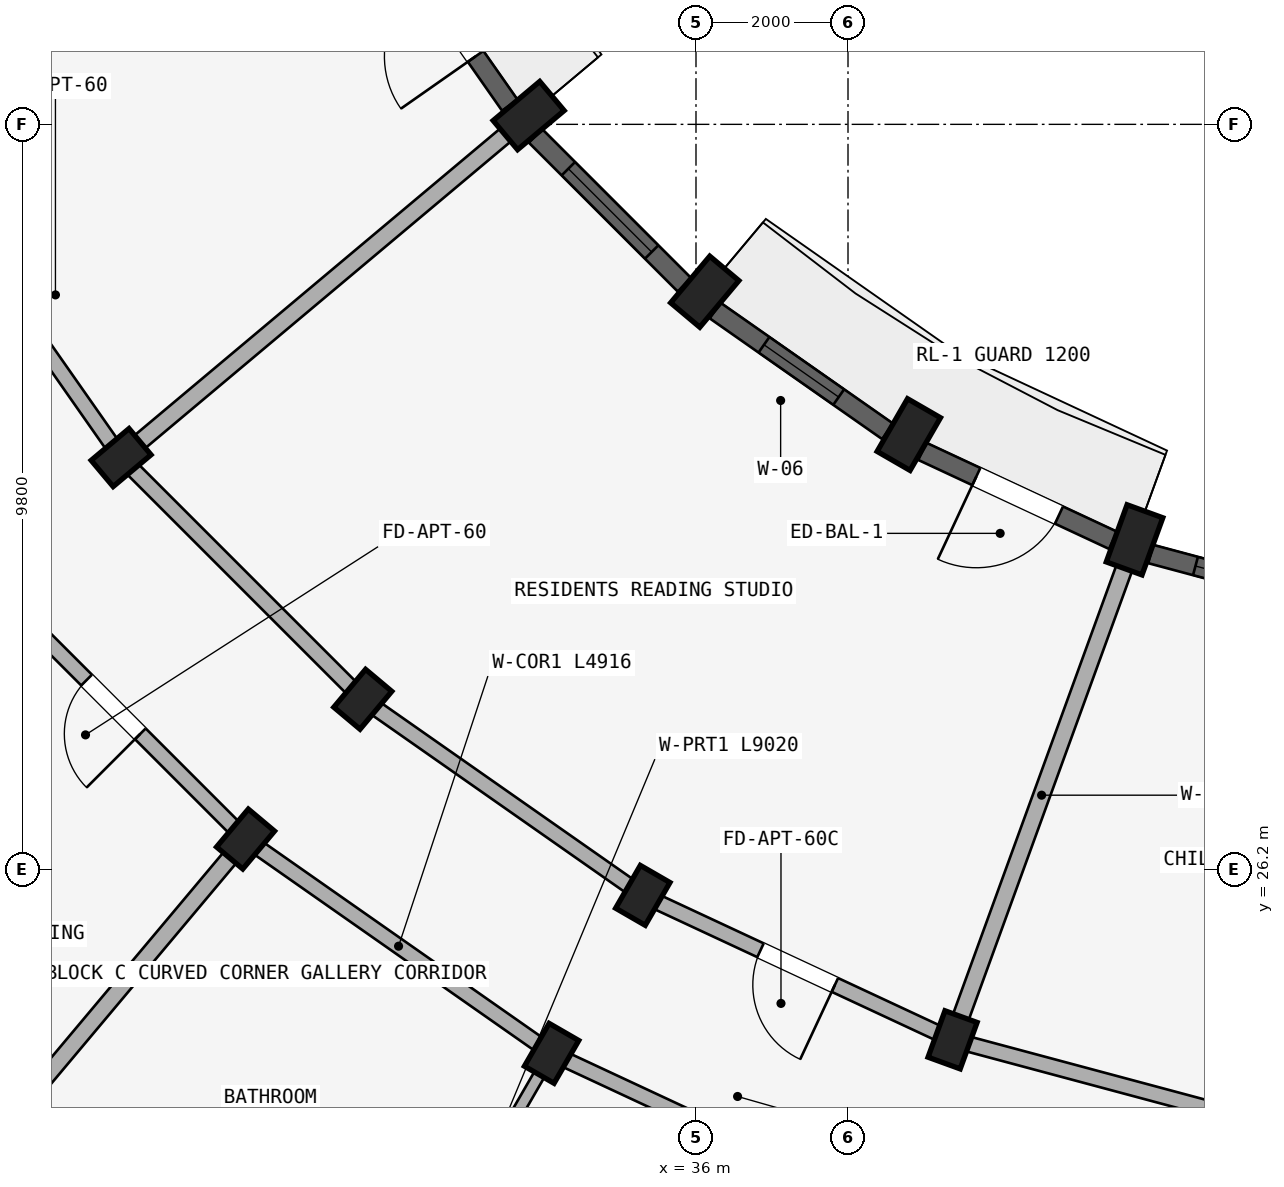
"""IFC4 building model, lengths in metres.
Left out: names, types, materials, properties, quantities, classifications, styles, units other than length and angle.
Written with IfcOpenShell. Run it as: python <this file> out.ifc"""

import sys

from ifc_helpers import new_model, si_unit, direction, frame, frame_2d, origin, origin_2d, place, context, subcontext, project, spatial, rectangle, extrude, element, fill, save


model = new_model("IFC4")
c1 = context("Model", 3, precision=1e-05, world=origin(), true_north=direction((0.0, 1.0)))
c2 = subcontext(c1, "Body", "Model", "MODEL_VIEW")
j1 = project(units=[si_unit("LENGTHUNIT", "METRE"), si_unit("PLANEANGLEUNIT", "RADIAN")], contexts=[c1])
p1 = place(None, origin())
s1 = spatial("IfcSite", under=j1, at=p1, CompositionType="ELEMENT")
p2 = place(p1, origin())
s2 = spatial("IfcBuilding", under=s1, at=p2, CompositionType="ELEMENT")
p3 = place(p2, frame((0.0, 0.0, 27.6)))
s3 = spatial("IfcBuildingStorey", under=s2, at=p3, CompositionType="ELEMENT", Elevation=27.6)
p4 = place(p3, frame((41.77, 30.534, 0.0), z_axis=(0.0, 0.0, 1.0), x_axis=(-0.939692620786, 0.342020143326, 0.0)))
e1 = element("IfcColumn", 1, at=p4, inside=s3, PredefinedType="COLUMN", context=c2, shape_type="SweptSolid", body=[
    extrude(rectangle(XDim=0.5, YDim=0.8, at=origin_2d()), origin(), (0.0, 0.0, 1.0), 2.93),
])
p5 = place(p3, frame((39.376, 23.956, 0.0), z_axis=(0.0, 0.0, 1.0), x_axis=(-0.939692620786, 0.342020143326, 0.0)))
e2 = element("IfcColumn", 2, at=p5, inside=s3, PredefinedType="COLUMN", context=c2, shape_type="SweptSolid", body=[
    extrude(rectangle(XDim=0.45, YDim=0.65, at=origin_2d()), origin(), (0.0, 0.0, 1.0), 2.93),
])
p6 = place(p3, frame((38.8, 31.919, 0.0), z_axis=(0.0, 0.0, 1.0), x_axis=(-0.866025403784, 0.5, 0.0)))
e3 = element("IfcColumn", 3, at=p6, inside=s3, PredefinedType="COLUMN", context=c2, shape_type="SweptSolid", body=[
    extrude(rectangle(XDim=0.5, YDim=0.8, at=origin_2d()), origin(), (0.0, 0.0, 1.0), 2.93),
])
for number, where, z_axis, x_axis in (
    (4, (35.3, 25.856, 0.0), (0.0, 0.0, 1.0), (-0.866, 0.5, 0.0)),
    (5, (34.1, 23.778, 0.0), (0.0, 0.0, 1.0), (-0.866, 0.5, 0.0)),
):
    element("IfcColumn", number, at=place(p3, frame(where, z_axis=z_axis, x_axis=x_axis)), inside=s3, PredefinedType="COLUMN", context=c2, shape_type="SweptSolid", body=[
        extrude(rectangle(XDim=0.45, YDim=0.65, at=origin_2d()), origin(), (0.0, 0.0, 1.0), 2.93),
    ])
p7 = place(p3, frame((36.115, 33.798, 0.0), z_axis=(0.0, 0.0, 1.0), x_axis=(-0.766044443119, 0.642787609687, 0.0)))
e6 = element("IfcColumn", 6, at=p7, inside=s3, PredefinedType="COLUMN", context=c2, shape_type="SweptSolid", body=[
    extrude(rectangle(XDim=0.5, YDim=0.8, at=origin_2d()), origin(), (0.0, 0.0, 1.0), 2.93),
])
for number, where, z_axis, x_axis in (
    (7, (31.616, 28.436, 0.0), (0.0, 0.0, 1.0), (-0.766, 0.643, 0.0)),
    (8, (30.073, 26.598, 0.0), (0.0, 0.0, 1.0), (-0.766, 0.643, 0.0)),
):
    element("IfcColumn", number, at=place(p3, frame(where, z_axis=z_axis, x_axis=x_axis)), inside=s3, PredefinedType="COLUMN", context=c2, shape_type="SweptSolid", body=[
        extrude(rectangle(XDim=0.45, YDim=0.65, at=origin_2d()), origin(), (0.0, 0.0, 1.0), 2.93),
    ])
p8 = place(p3, frame((33.798, 36.115, 0.0), z_axis=(0.0, 0.0, 1.0), x_axis=(-0.642787609687, 0.766044443119, 0.0)))
e9 = element("IfcColumn", 9, at=p8, inside=s3, PredefinedType="COLUMN", context=c2, shape_type="SweptSolid", body=[
    extrude(rectangle(XDim=0.5, YDim=0.8, at=origin_2d()), origin(), (0.0, 0.0, 1.0), 2.93),
])
p9 = place(p3, frame((28.436, 31.616, 0.0), z_axis=(0.0, 0.0, 1.0), x_axis=(-0.642787609687, 0.766044443119, 0.0)))
e10 = element("IfcColumn", 10, at=p9, inside=s3, PredefinedType="COLUMN", context=c2, shape_type="SweptSolid", body=[
    extrude(rectangle(XDim=0.45, YDim=0.65, at=origin_2d()), origin(), (0.0, 0.0, 1.0), 2.93),
])
p10 = place(p3, frame((43.72, 22.792, 0.0), z_axis=(0.0, 0.0, 1.0), x_axis=(-0.965934240054, 0.258787642463, 0.0)))
e11 = element("IfcWall", 11, at=p10, inside=s3, PredefinedType="STANDARD", context=c2, shape_type="SweptSolid", body=[
    extrude(rectangle(XDim=4.497, YDim=0.2, at=frame_2d((2.249, 0.0))), origin(), (0.0, 0.0, 1.0), 2.372),
])
p11 = place(p3, frame((39.376, 23.956, 0.0), z_axis=(0.0, 0.0, 1.0), x_axis=(-0.906307919131, 0.422617978463, 0.0)))
e12 = element("IfcWall", 12, at=p11, inside=s3, PredefinedType="STANDARD", context=c2, shape_type="SweptSolid", body=[
    extrude(rectangle(XDim=4.497, YDim=0.2, at=frame_2d((2.249, 0.0))), origin(), (0.0, 0.0, 1.0), 2.372),
])
p12 = place(p11, frame((1.709, 0.0, 0.0)))
e13 = element("IfcOpeningElement", 13, at=p12, cuts=e12, PredefinedType="OPENING", context=c2, shape_type="SweptSolid", body=[
    extrude(rectangle(XDim=1.08, YDim=2.15, at=frame_2d((0.54, 1.075))), frame((0.0, 0.11, 0.0), z_axis=(0.0, -1.0, 0.0), x_axis=(1.0, 0.0, 0.0)), (0.0, 0.0, 1.0), 0.22),
])
p13 = place(p3, frame((38.555, 21.701, 0.0), z_axis=(0.0, 0.0, 1.0), x_axis=(-0.906302381024, 0.422629854778, 0.0)))
e14 = element("IfcWall", 14, at=p13, inside=s3, PredefinedType="STANDARD", context=c2, shape_type="SweptSolid", body=[
    extrude(rectangle(XDim=4.915, YDim=0.2, at=frame_2d((2.458, 0.0))), origin(), (0.0, 0.0, 1.0), 2.372),
])
p14 = place(p13, frame((1.888, 0.0, 0.0)))
e15 = element("IfcOpeningElement", 15, at=p14, cuts=e14, PredefinedType="OPENING", context=c2, shape_type="SweptSolid", body=[
    extrude(rectangle(XDim=1.14, YDim=2.15, at=frame_2d((0.57, 1.075))), frame((0.0, 0.11, 0.0), z_axis=(0.0, -1.0, 0.0), x_axis=(1.0, 0.0, 0.0)), (0.0, 0.0, 1.0), 0.22),
])
p15 = place(p3, frame((35.3, 25.856, 0.0), z_axis=(0.0, 0.0, 1.0), x_axis=(-0.819155404658, 0.573571637217, 0.0)))
e16 = element("IfcWall", 16, at=p15, inside=s3, PredefinedType="STANDARD", context=c2, shape_type="SweptSolid", body=[
    extrude(rectangle(XDim=4.497, YDim=0.2, at=frame_2d((2.249, 0.0))), origin(), (0.0, 0.0, 1.0), 2.372),
])
p16 = place(p3, frame((34.1, 23.778, 0.0), z_axis=(0.0, 0.0, 1.0), x_axis=(-0.819140911474, 0.573592335331, 0.0)))
e17 = element("IfcWall", 17, at=p16, inside=s3, PredefinedType="STANDARD", context=c2, shape_type="SweptSolid", body=[
    extrude(rectangle(XDim=4.916, YDim=0.2, at=frame_2d((2.458, 0.0))), origin(), (0.0, 0.0, 1.0), 2.372),
])
p17 = place(p3, frame((31.616, 28.436, 0.0), z_axis=(0.0, 0.0, 1.0), x_axis=(-0.707106781187, 0.707106781187, 0.0)))
e18 = element("IfcWall", 18, at=p17, inside=s3, PredefinedType="STANDARD", context=c2, shape_type="SweptSolid", body=[
    extrude(rectangle(XDim=4.497, YDim=0.2, at=frame_2d((2.249, 0.0))), origin(), (0.0, 0.0, 1.0), 2.372),
])
p18 = place(p3, frame((30.073, 26.598, 0.0), z_axis=(0.0, 0.0, 1.0), x_axis=(-0.707106781187, 0.707106781187, 0.0)))
e19 = element("IfcWall", 19, at=p18, inside=s3, PredefinedType="STANDARD", context=c2, shape_type="SweptSolid", body=[
    extrude(rectangle(XDim=4.916, YDim=0.2, at=frame_2d((2.458, 0.0))), origin(), (0.0, 0.0, 1.0), 2.372),
])
p19 = place(p18, frame((1.958, 0.0, 0.0)))
e20 = element("IfcOpeningElement", 20, at=p19, cuts=e19, PredefinedType="OPENING", context=c2, shape_type="SweptSolid", body=[
    extrude(rectangle(XDim=1.0, YDim=2.15, at=frame_2d((0.5, 1.075))), frame((0.0, 0.11, 0.0), z_axis=(0.0, -1.0, 0.0), x_axis=(1.0, 0.0, 0.0)), (0.0, 0.0, 1.0), 0.22),
])
p20 = place(p3, frame((28.436, 31.616, 0.0), z_axis=(0.0, 0.0, 1.0), x_axis=(-0.573571637217, 0.819155404658, 0.0)))
e21 = element("IfcWall", 21, at=p20, inside=s3, PredefinedType="STANDARD", context=c2, shape_type="SweptSolid", body=[
    extrude(rectangle(XDim=4.497, YDim=0.2, at=frame_2d((2.249, 0.0))), origin(), (0.0, 0.0, 1.0), 2.372),
])
p21 = place(p20, frame((1.749, 0.0, 0.0)))
e22 = element("IfcOpeningElement", 22, at=p21, cuts=e21, PredefinedType="OPENING", context=c2, shape_type="SweptSolid", body=[
    extrude(rectangle(XDim=1.0, YDim=2.15, at=frame_2d((0.5, 1.075))), frame((0.0, 0.11, 0.0), z_axis=(0.0, -1.0, 0.0), x_axis=(1.0, 0.0, 0.0)), (0.0, 0.0, 1.0), 0.22),
])
p22 = place(p3, frame((41.702, 30.346, 0.0), z_axis=(0.0, 0.0, 1.0), x_axis=(-0.342010221662, -0.939696231917, 0.0)))
e23 = element("IfcWall", 23, at=p22, inside=s3, PredefinedType="STANDARD", context=c2, shape_type="SweptSolid", body=[
    extrude(rectangle(XDim=6.75, YDim=0.22, at=frame_2d((3.375, 0.0))), origin(), (0.0, 0.0, 1.0), 2.372),
])
p23 = place(p3, frame((34.05, 23.691, 0.0), z_axis=(0.0, 0.0, 1.0), x_axis=(-0.500002045973, -0.866024222538, 0.0)))
e24 = element("IfcWall", 24, at=p23, inside=s3, PredefinedType="PARTITIONING", context=c2, shape_type="SweptSolid", body=[
    extrude(rectangle(XDim=9.02, YDim=0.15, at=frame_2d((4.51, 0.0))), origin(), (0.0, 0.0, 1.0), 2.372),
])
p24 = place(p23, frame((4.45, 0.0, 0.0)))
e25 = element("IfcOpeningElement", 25, at=p24, cuts=e24, PredefinedType="OPENING", context=c2, shape_type="SweptSolid", body=[
    extrude(rectangle(XDim=0.8, YDim=2.1, at=frame_2d((0.4, 1.05))), frame((0.0, 0.085, 0.0), z_axis=(0.0, -1.0, 0.0), x_axis=(1.0, 0.0, 0.0)), (0.0, 0.0, 1.0), 0.17),
])
p25 = place(p3, frame((30.009, 26.521, 0.0), z_axis=(0.0, 0.0, 1.0), x_axis=(-0.642784468535, -0.766047078847, 0.0)))
e26 = element("IfcWall", 26, at=p25, inside=s3, PredefinedType="STANDARD", context=c2, shape_type="SweptSolid", body=[
    extrude(rectangle(XDim=9.02, YDim=0.22, at=frame_2d((4.51, 0.0))), origin(), (0.0, 0.0, 1.0), 2.372),
])
p26 = place(p3, frame((33.645, 35.987, 0.0), z_axis=(0.0, 0.0, 1.0), x_axis=(-0.766046761698, -0.642784846501, 0.0)))
e27 = element("IfcWall", 27, at=p26, inside=s3, PredefinedType="STANDARD", context=c2, shape_type="SweptSolid", body=[
    extrude(rectangle(XDim=6.75, YDim=0.22, at=frame_2d((3.375, 0.0))), origin(), (0.0, 0.0, 1.0), 2.372),
])
p27 = place(p3, frame((44.658, 29.631, 0.0), z_axis=(0.0, 0.0, 1.0), x_axis=(-0.965935855992, 0.25878161084, 0.0)))
e28 = element("IfcWall", 28, at=p27, inside=s3, PredefinedType="STANDARD", context=c2, shape_type="SweptSolid", body=[
    extrude(rectangle(XDim=2.77, YDim=0.25, at=frame_2d((1.385, 0.0))), origin(), (0.0, 0.0, 1.0), 2.472),
])
p28 = place(p27, frame((0.61, 0.0, 0.672)))
e29 = element("IfcOpeningElement", 29, at=p28, cuts=e28, PredefinedType="OPENING", context=c2, shape_type="SweptSolid", body=[
    extrude(rectangle(XDim=1.55, YDim=1.6, at=frame_2d((0.775, 0.8))), frame((0.0, 0.135, 0.0), z_axis=(0.0, -1.0, 0.0), x_axis=(1.0, 0.0, 0.0)), (0.0, 0.0, 1.0), 0.27),
])
p29 = place(p3, frame((41.487, 30.528, 0.0), z_axis=(0.0, 0.0, 1.0), x_axis=(-0.906293449611, 0.422649007088, 0.0)))
e30 = element("IfcWall", 30, at=p29, inside=s3, PredefinedType="STANDARD", context=c2, shape_type="SweptSolid", body=[
    extrude(rectangle(XDim=2.77, YDim=0.25, at=frame_2d((1.385, 0.0))), origin(), (0.0, 0.0, 1.0), 2.472),
])
p30 = place(p29, frame((0.785, 0.0, 0.0)))
e31 = element("IfcOpeningElement", 31, at=p30, cuts=e30, PredefinedType="OPENING", context=c2, shape_type="SweptSolid", body=[
    extrude(rectangle(XDim=1.2, YDim=2.15, at=frame_2d((0.6, 1.075))), frame((0.0, 0.135, 0.0), z_axis=(0.0, -1.0, 0.0), x_axis=(1.0, 0.0, 0.0)), (0.0, 0.0, 1.0), 0.27),
])
p31 = place(p3, frame((38.521, 31.962, 0.0), z_axis=(0.0, 0.0, 1.0), x_axis=(-0.819111815273, 0.573633885053, 0.0)))
e32 = element("IfcWall", 32, at=p31, inside=s3, PredefinedType="STANDARD", context=c2, shape_type="SweptSolid", body=[
    extrude(rectangle(XDim=2.77, YDim=0.25, at=frame_2d((1.385, 0.0))), origin(), (0.0, 0.0, 1.0), 2.472),
])
p32 = place(p31, frame((0.785, 0.0, 0.772)))
e33 = element("IfcOpeningElement", 33, at=p32, cuts=e32, PredefinedType="OPENING", context=c2, shape_type="SweptSolid", body=[
    extrude(rectangle(XDim=1.2, YDim=1.5, at=frame_2d((0.6, 0.75))), frame((0.0, 0.135, 0.0), z_axis=(0.0, -1.0, 0.0), x_axis=(1.0, 0.0, 0.0)), (0.0, 0.0, 1.0), 0.27),
])
p33 = place(p3, frame((35.848, 33.889, 0.0), z_axis=(0.0, 0.0, 1.0), x_axis=(-0.707106781187, 0.707106781187, 0.0)))
e34 = element("IfcWall", 34, at=p33, inside=s3, PredefinedType="STANDARD", context=c2, shape_type="SweptSolid", body=[
    extrude(rectangle(XDim=2.77, YDim=0.25, at=frame_2d((1.385, 0.0))), origin(), (0.0, 0.0, 1.0), 2.472),
])
p34 = place(p33, frame((0.61, 0.0, 0.672)))
e35 = element("IfcOpeningElement", 35, at=p34, cuts=e34, PredefinedType="OPENING", context=c2, shape_type="SweptSolid", body=[
    extrude(rectangle(XDim=1.55, YDim=1.6, at=frame_2d((0.775, 0.8))), frame((0.0, 0.135, 0.0), z_axis=(0.0, -1.0, 0.0), x_axis=(1.0, 0.0, 0.0)), (0.0, 0.0, 1.0), 0.27),
])
p35 = place(p3, frame((33.551, 36.252, 0.0), z_axis=(0.0, 0.0, 1.0), x_axis=(-0.573633885053, 0.819111815273, 0.0)))
e36 = element("IfcWall", 36, at=p35, inside=s3, PredefinedType="STANDARD", context=c2, shape_type="SweptSolid", body=[
    extrude(rectangle(XDim=2.77, YDim=0.25, at=frame_2d((1.385, 0.0))), origin(), (0.0, 0.0, 1.0), 2.472),
])
p36 = place(p35, frame((0.785, 0.0, 0.0)))
e37 = element("IfcOpeningElement", 37, at=p36, cuts=e36, PredefinedType="OPENING", context=c2, shape_type="SweptSolid", body=[
    extrude(rectangle(XDim=1.2, YDim=2.15, at=frame_2d((0.6, 1.075))), frame((0.0, 0.135, 0.0), z_axis=(0.0, -1.0, 0.0), x_axis=(1.0, 0.0, 0.0)), (0.0, 0.0, 1.0), 0.27),
])
p37 = place(p28, origin())
e38 = element("IfcWindow", 38, at=p37, inside=s3, PartitioningType="DOUBLE_PANEL_VERTICAL", PredefinedType="WINDOW", context=c2, shape_type="SweptSolid", body=[
    extrude(rectangle(XDim=1.55, YDim=1.6, at=frame_2d((0.775, 0.8))), frame((0.0, 0.03, 0.0), z_axis=(0.0, -1.0, 0.0), x_axis=(1.0, 0.0, 0.0)), (0.0, 0.0, 1.0), 0.06),
])
fill(e29, e38)
p38 = place(p32, origin())
e39 = element("IfcWindow", 39, at=p38, inside=s3, PartitioningType="SINGLE_PANEL", PredefinedType="WINDOW", context=c2, shape_type="SweptSolid", body=[
    extrude(rectangle(XDim=1.2, YDim=1.5, at=frame_2d((0.6, 0.75))), frame((0.0, 0.03, 0.0), z_axis=(0.0, -1.0, 0.0), x_axis=(1.0, 0.0, 0.0)), (0.0, 0.0, 1.0), 0.06),
])
fill(e33, e39)
p39 = place(p34, origin())
e40 = element("IfcWindow", 40, at=p39, inside=s3, PartitioningType="DOUBLE_PANEL_VERTICAL", PredefinedType="WINDOW", context=c2, shape_type="SweptSolid", body=[
    extrude(rectangle(XDim=1.55, YDim=1.6, at=frame_2d((0.775, 0.8))), frame((0.0, 0.03, 0.0), z_axis=(0.0, -1.0, 0.0), x_axis=(1.0, 0.0, 0.0)), (0.0, 0.0, 1.0), 0.06),
])
fill(e35, e40)
p40 = place(p19, frame((1.0, 0.0, 0.0), z_axis=(0.0, 0.0, 1.0), x_axis=(-1.0, 0.0, 0.0)))
e41 = element("IfcDoor", 41, at=p40, inside=s3, OperationType="SINGLE_SWING_RIGHT", PredefinedType="DOOR", context=c2, shape_type="SweptSolid", body=[
    extrude(rectangle(XDim=1.0, YDim=2.15, at=frame_2d((0.5, 1.075))), frame((0.0, 0.025, 0.0), z_axis=(0.0, -1.0, 0.0), x_axis=(1.0, 0.0, 0.0)), (0.0, 0.0, 1.0), 0.05),
])
fill(e20, e41)
p41 = place(p12, frame((1.08, 0.0, 0.0), z_axis=(0.0, 0.0, 1.0), x_axis=(-1.0, 0.0, 0.0)))
e42 = element("IfcDoor", 42, at=p41, inside=s3, OperationType="SINGLE_SWING_RIGHT", PredefinedType="DOOR", context=c2, shape_type="SweptSolid", body=[
    extrude(rectangle(XDim=1.08, YDim=2.15, at=frame_2d((0.54, 1.075))), frame((0.0, 0.025, 0.0), z_axis=(0.0, -1.0, 0.0), x_axis=(1.0, 0.0, 0.0)), (0.0, 0.0, 1.0), 0.05),
])
fill(e13, e42)
p42 = place(p30, frame((1.2, 0.0, 0.0), z_axis=(0.0, 0.0, 1.0), x_axis=(-1.0, 0.0, 0.0)))
e43 = element("IfcDoor", 43, at=p42, inside=s3, OperationType="SINGLE_SWING_LEFT", PredefinedType="DOOR", context=c2, shape_type="SweptSolid", body=[
    extrude(rectangle(XDim=1.2, YDim=2.15, at=frame_2d((0.6, 1.075))), frame((0.0, 0.025, 0.0), z_axis=(0.0, -1.0, 0.0), x_axis=(1.0, 0.0, 0.0)), (0.0, 0.0, 1.0), 0.05),
])
fill(e31, e43)
p43 = place(p36, frame((1.2, 0.0, 0.0), z_axis=(0.0, 0.0, 1.0), x_axis=(-1.0, 0.0, 0.0)))
e44 = element("IfcDoor", 44, at=p43, inside=s3, OperationType="SINGLE_SWING_RIGHT", PredefinedType="DOOR", context=c2, shape_type="SweptSolid", body=[
    extrude(rectangle(XDim=1.2, YDim=2.15, at=frame_2d((0.6, 1.075))), frame((0.0, 0.025, 0.0), z_axis=(0.0, -1.0, 0.0), x_axis=(1.0, 0.0, 0.0)), (0.0, 0.0, 1.0), 0.05),
])
fill(e37, e44)
save(model, sys.argv[1])
